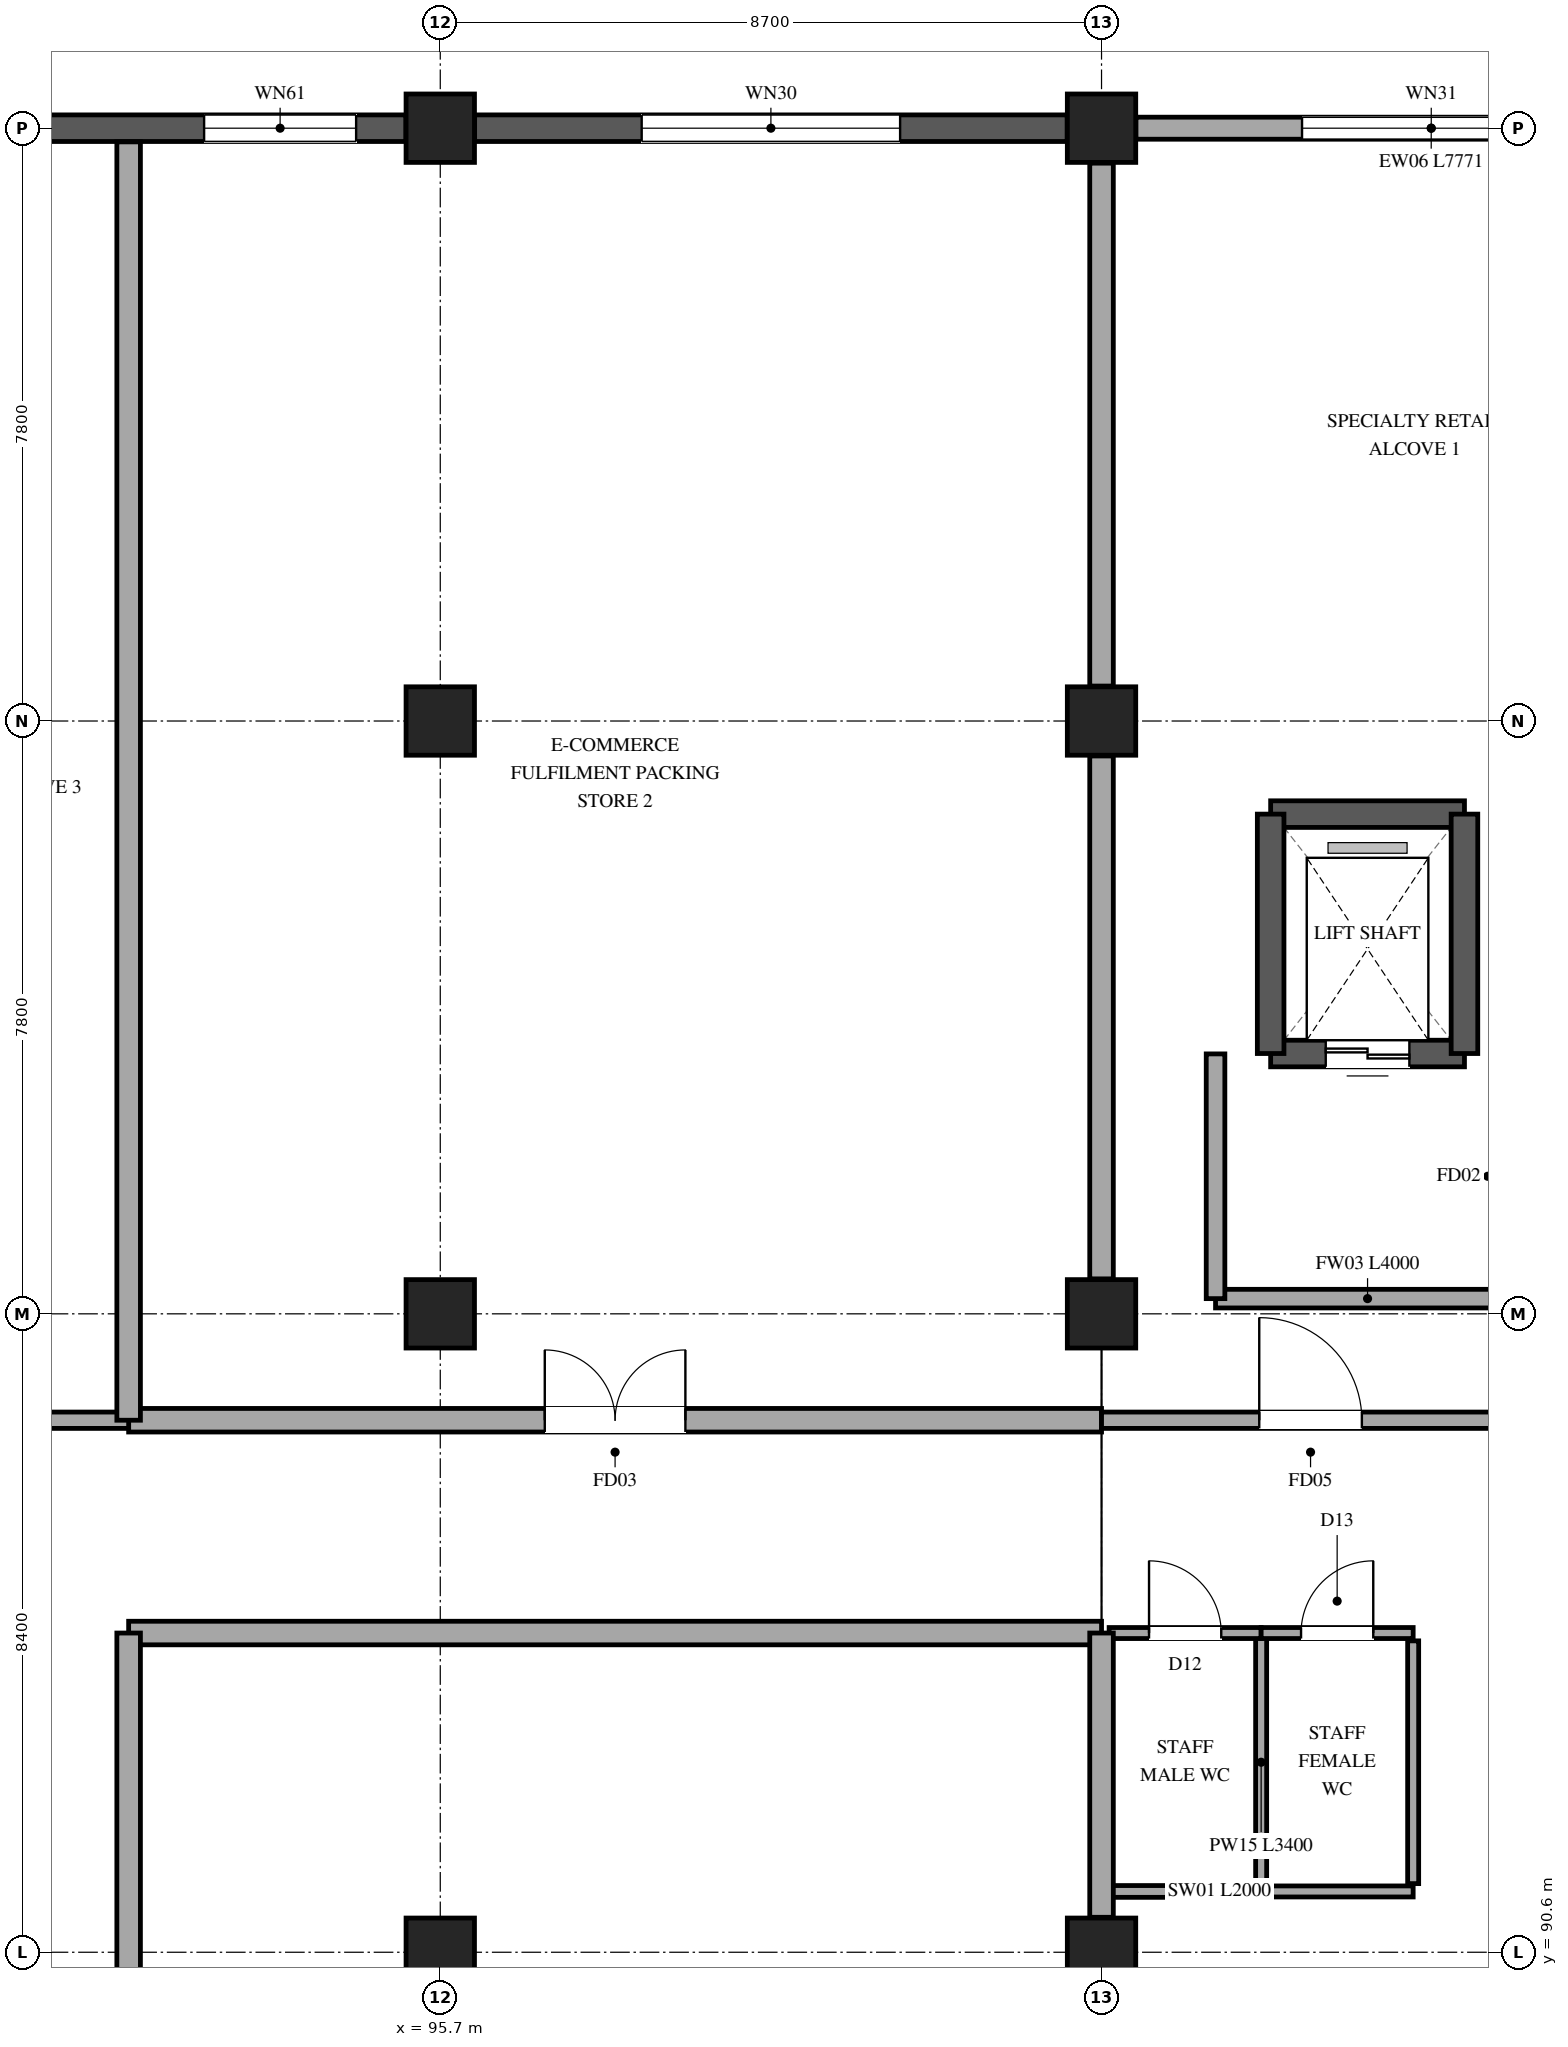
"""IFC4 building model, lengths in metres.
Left out: names, types, materials, properties, quantities, classifications, styles, units other than length and angle.
Written with IfcOpenShell. Run it as: python <this file> out.ifc"""

import sys

from ifc_helpers import new_model, si_unit, direction, frame, frame_2d, origin, origin_2d, place, context, subcontext, project, spatial, rectangle, extrude, element, fill, save


model = new_model("IFC4")
c1 = context("Model", 3, precision=1e-05, world=origin(), true_north=direction((0.0, 1.0)))
c2 = subcontext(c1, "Body", "Model", "MODEL_VIEW")
j1 = project(units=[si_unit("LENGTHUNIT", "METRE"), si_unit("PLANEANGLEUNIT", "RADIAN")], contexts=[c1])
p1 = place(None, origin())
s1 = spatial("IfcSite", under=j1, at=p1, CompositionType="ELEMENT")
p2 = place(p1, origin())
s2 = spatial("IfcBuilding", under=s1, at=p2, CompositionType="ELEMENT")
p3 = place(p2, frame((0.0, 0.0, 11.4)))
s3 = spatial("IfcBuildingStorey", under=s2, at=p3, CompositionType="ELEMENT", Elevation=11.4)
for number, where, z_axis, x_axis in (
    (1, (95.7, 90.6, 0.0), (0.0, 0.0, 1.0), (1.0, 0.0, 0.0)),
    (2, (95.7, 99.0, 0.0), (0.0, 0.0, 1.0), (1.0, 0.0, 0.0)),
    (3, (95.7, 106.8, 0.0), (0.0, 0.0, 1.0), (1.0, 0.0, 0.0)),
    (4, (95.7, 114.6, 0.0), (0.0, 0.0, 1.0), (1.0, 0.0, 0.0)),
    (5, (104.4, 90.6, 0.0), (0.0, 0.0, 1.0), (1.0, 0.0, 0.0)),
    (6, (104.4, 99.0, 0.0), (0.0, 0.0, 1.0), (1.0, 0.0, 0.0)),
    (7, (104.4, 106.8, 0.0), (0.0, 0.0, 1.0), (1.0, 0.0, 0.0)),
    (8, (104.4, 114.6, 0.0), (0.0, 0.0, 1.0), (1.0, 0.0, 0.0)),
):
    element("IfcColumn", number, at=place(p3, frame(where, z_axis=z_axis, x_axis=x_axis)), inside=s3, PredefinedType="COLUMN", context=c2, shape_type="SweptSolid", body=[
        extrude(rectangle(XDim=0.9, YDim=0.9, at=origin_2d()), origin(), (0.0, 0.0, 1.0), 5.1),
    ])
p4 = place(p3, frame((87.452, 114.6, 0.0), z_axis=(0.0, 0.0, 1.0), x_axis=(1.0, 0.0, 0.0)))
e9 = element("IfcWall", 9, at=p4, inside=s3, PredefinedType="STANDARD", context=c2, shape_type="SweptSolid", body=[
    extrude(rectangle(XDim=7.796, YDim=0.35, at=frame_2d((3.898, 0.0))), origin(), (0.0, 0.0, 1.0), 4.79),
])
p5 = place(p4, frame((5.141, 0.0, 0.85)))
e10 = element("IfcOpeningElement", 10, at=p5, cuts=e9, PredefinedType="OPENING", context=c2, shape_type="SweptSolid", body=[
    extrude(rectangle(XDim=2.0, YDim=1.65, at=frame_2d((1.0, 0.825))), frame((0.0, 0.185, 0.0), z_axis=(0.0, -1.0, 0.0), x_axis=(1.0, 0.0, 0.0)), (0.0, 0.0, 1.0), 0.37),
])
p6 = place(p3, frame((96.152, 114.6, 0.0), z_axis=(0.0, 0.0, 1.0), x_axis=(1.0, 0.0, 0.0)))
e11 = element("IfcWall", 11, at=p6, inside=s3, PredefinedType="STANDARD", context=c2, shape_type="SweptSolid", body=[
    extrude(rectangle(XDim=7.796, YDim=0.35, at=frame_2d((3.898, 0.0))), origin(), (0.0, 0.0, 1.0), 4.79),
])
p7 = place(p6, frame((2.198, 0.0, 0.85)))
e12 = element("IfcOpeningElement", 12, at=p7, cuts=e11, PredefinedType="OPENING", context=c2, shape_type="SweptSolid", body=[
    extrude(rectangle(XDim=3.4, YDim=2.4, at=frame_2d((1.7, 1.2))), frame((0.0, 0.185, 0.0), z_axis=(0.0, -1.0, 0.0), x_axis=(1.0, 0.0, 0.0)), (0.0, 0.0, 1.0), 0.37),
])
p8 = place(p3, frame((104.852, 114.6, 0.0), z_axis=(0.0, 0.0, 1.0), x_axis=(1.0, 0.0, 0.0)))
e13 = element("IfcWall", 13, at=p8, inside=s3, PredefinedType="STANDARD", context=c2, shape_type="SweptSolid", body=[
    extrude(rectangle(XDim=7.771, YDim=0.29, at=frame_2d((3.885, 0.0))), origin(), (0.0, 0.0, 1.0), 4.055),
])
p9 = place(p8, frame((2.186, 0.0, 0.85)))
e14 = element("IfcOpeningElement", 14, at=p9, cuts=e13, PredefinedType="OPENING", context=c2, shape_type="SweptSolid", body=[
    extrude(rectangle(XDim=3.4, YDim=2.2, at=frame_2d((1.7, 1.1))), frame((0.0, 0.155, 0.0), z_axis=(0.0, -1.0, 0.0), x_axis=(1.0, 0.0, 0.0)), (0.0, 0.0, 1.0), 0.31),
])
p10 = place(p3, frame((106.625, 105.575, 0.0), z_axis=(0.0, 0.0, 1.0), x_axis=(1.0, 0.0, 0.0)))
e15 = element("IfcWall", 15, at=p10, inside=s3, PredefinedType="SHEAR", context=c2, shape_type="SweptSolid", body=[
    extrude(rectangle(XDim=2.55, YDim=0.35, at=frame_2d((1.275, 0.0))), origin(), (0.0, 0.0, 1.0), 5.1),
])
p11 = place(p3, frame((109.175, 102.425, 0.0), z_axis=(0.0, 0.0, 1.0), x_axis=(-1.0, 0.0, 0.0)))
e16 = element("IfcWall", 16, at=p11, inside=s3, PredefinedType="SHEAR", context=c2, shape_type="SweptSolid", body=[
    extrude(rectangle(XDim=2.55, YDim=0.35, at=frame_2d((1.275, 0.0))), origin(), (0.0, 0.0, 1.0), 5.1),
])
p12 = place(p11, frame((0.725, 0.0, 0.0)))
e17 = element("IfcOpeningElement", 17, at=p12, cuts=e16, PredefinedType="OPENING", context=c2, shape_type="SweptSolid", body=[
    extrude(rectangle(XDim=1.1, YDim=2.2, at=frame_2d((0.55, 1.1))), frame((0.0, 0.185, 0.0), z_axis=(0.0, -1.0, 0.0), x_axis=(1.0, 0.0, 0.0)), (0.0, 0.0, 1.0), 0.37),
])
for number, where, z_axis, x_axis in (
    (18, (106.625, 102.425, 0.0), (0.0, 0.0, 1.0), (0.0, 1.0, 0.0)),
    (19, (109.175, 105.575, 0.0), (0.0, 0.0, 1.0), (0.0, -1.0, 0.0)),
):
    element("IfcWall", number, at=place(p3, frame(where, z_axis=z_axis, x_axis=x_axis)), inside=s3, PredefinedType="SHEAR", context=c2, shape_type="SweptSolid", body=[
        extrude(rectangle(XDim=3.15, YDim=0.35, at=frame_2d((1.575, 0.0))), origin(), (0.0, 0.0, 1.0), 5.1),
    ])
p13 = place(p3, frame((109.9, 99.2, 0.0), z_axis=(0.0, 0.0, 1.0), x_axis=(-1.0, 0.0, 0.0)))
e20 = element("IfcWall", 20, at=p13, inside=s3, PredefinedType="STANDARD", context=c2, shape_type="SweptSolid", body=[
    extrude(rectangle(XDim=4.0, YDim=0.245, at=frame_2d((2.0, 0.0))), origin(), (0.0, 0.0, 1.0), 4.075),
])
p14 = place(p3, frame((105.9, 99.2, 0.0), z_axis=(0.0, 0.0, 1.0), x_axis=(0.0, 1.0, 0.0)))
e21 = element("IfcWall", 21, at=p14, inside=s3, PredefinedType="STANDARD", context=c2, shape_type="SweptSolid", body=[
    extrude(rectangle(XDim=3.22, YDim=0.245, at=frame_2d((1.61, 0.0))), origin(), (0.0, 0.0, 1.0), 4.075),
])
p15 = place(p3, frame((106.5, 94.8, 0.0), z_axis=(0.0, 0.0, 1.0), x_axis=(0.0, -1.0, 0.0)))
e22 = element("IfcWall", 22, at=p15, inside=s3, PredefinedType="PARTITIONING", context=c2, shape_type="SweptSolid", body=[
    extrude(rectangle(XDim=3.4, YDim=0.145, at=frame_2d((1.7, 0.0))), origin(), (0.0, 0.0, 1.0), 4.76),
])
p16 = place(p3, frame((104.5, 94.8, 0.0), z_axis=(0.0, 0.0, 1.0), x_axis=(1.0, 0.0, 0.0)))
e23 = element("IfcWall", 23, at=p16, inside=s3, PredefinedType="PARTITIONING", context=c2, shape_type="SweptSolid", body=[
    extrude(rectangle(XDim=2.0, YDim=0.145, at=frame_2d((1.0, 0.0))), origin(), (0.0, 0.0, 1.0), 4.175),
])
p17 = place(p16, frame((0.525, 0.0, 0.0)))
e24 = element("IfcOpeningElement", 24, at=p17, cuts=e23, PredefinedType="OPENING", context=c2, shape_type="SweptSolid", body=[
    extrude(rectangle(XDim=0.95, YDim=2.15, at=frame_2d((0.475, 1.075))), frame((0.0, 0.083, 0.0), z_axis=(0.0, -1.0, 0.0), x_axis=(1.0, 0.0, 0.0)), (0.0, 0.0, 1.0), 0.165),
])
p18 = place(p3, frame((106.5, 91.4, 0.0), z_axis=(0.0, 0.0, 1.0), x_axis=(-1.0, 0.0, 0.0)))
e25 = element("IfcWall", 25, at=p18, inside=s3, PredefinedType="MOVABLE", context=c2, shape_type="SweptSolid", body=[
    extrude(rectangle(XDim=2.0, YDim=0.155, at=frame_2d((1.0, 0.0))), origin(), (0.0, 0.0, 1.0), 4.175),
])
p19 = place(p3, frame((106.5, 94.8, 0.0), z_axis=(0.0, 0.0, 1.0), x_axis=(1.0, 0.0, 0.0)))
e26 = element("IfcWall", 26, at=p19, inside=s3, PredefinedType="PARTITIONING", context=c2, shape_type="SweptSolid", body=[
    extrude(rectangle(XDim=2.0, YDim=0.145, at=frame_2d((1.0, 0.0))), origin(), (0.0, 0.0, 1.0), 4.76),
])
p20 = place(p19, frame((0.525, 0.0, 0.0)))
e27 = element("IfcOpeningElement", 27, at=p20, cuts=e26, PredefinedType="OPENING", context=c2, shape_type="SweptSolid", body=[
    extrude(rectangle(XDim=0.95, YDim=2.2, at=frame_2d((0.475, 1.1))), frame((0.0, 0.083, 0.0), z_axis=(0.0, -1.0, 0.0), x_axis=(1.0, 0.0, 0.0)), (0.0, 0.0, 1.0), 0.165),
])
p21 = place(p3, frame((108.5, 91.4, 0.0), z_axis=(0.0, 0.0, 1.0), x_axis=(-1.0, 0.0, 0.0)))
e28 = element("IfcWall", 28, at=p21, inside=s3, PredefinedType="PARTITIONING", context=c2, shape_type="SweptSolid", body=[
    extrude(rectangle(XDim=2.0, YDim=0.145, at=frame_2d((1.0, 0.0))), origin(), (0.0, 0.0, 1.0), 4.76),
])
p22 = place(p3, frame((104.4, 94.8, 0.0), z_axis=(0.0, 0.0, 1.0), x_axis=(-1.0, 0.0, 0.0)))
e29 = element("IfcWall", 29, at=p22, inside=s3, PredefinedType="STANDARD", context=c2, shape_type="SweptSolid", body=[
    extrude(rectangle(XDim=12.8, YDim=0.31, at=frame_2d((6.4, 0.0))), origin(), (0.0, 0.0, 1.0), 4.06),
])
p23 = place(p3, frame((91.6, 94.8, 0.0), z_axis=(0.0, 0.0, 1.0), x_axis=(0.0, -1.0, 0.0)))
e30 = element("IfcWall", 30, at=p23, inside=s3, PredefinedType="STANDARD", context=c2, shape_type="SweptSolid", body=[
    extrude(rectangle(XDim=21.0, YDim=0.31, at=frame_2d((10.5, 0.0))), origin(), (0.0, 0.0, 1.0), 4.06),
])
p24 = place(p23, frame((9.575, 0.0, 0.0)))
e31 = element("IfcOpeningElement", 31, at=p24, cuts=e30, PredefinedType="OPENING", context=c2, shape_type="SweptSolid", body=[
    extrude(rectangle(XDim=1.85, YDim=2.3, at=frame_2d((0.925, 1.15))), frame((0.0, 0.165, 0.0), z_axis=(0.0, -1.0, 0.0), x_axis=(1.0, 0.0, 0.0)), (0.0, 0.0, 1.0), 0.33),
])
p25 = place(p3, frame((91.6, 97.6, 0.0), z_axis=(0.0, 0.0, 1.0), x_axis=(1.0, 0.0, 0.0)))
e32 = element("IfcWall", 32, at=p25, inside=s3, PredefinedType="STANDARD", context=c2, shape_type="SweptSolid", body=[
    extrude(rectangle(XDim=12.8, YDim=0.31, at=frame_2d((6.4, 0.0))), origin(), (0.0, 0.0, 1.0), 4.06),
])
p26 = place(p25, frame((5.475, 0.0, 0.0)))
e33 = element("IfcOpeningElement", 33, at=p26, cuts=e32, PredefinedType="OPENING", context=c2, shape_type="SweptSolid", body=[
    extrude(rectangle(XDim=1.85, YDim=2.3, at=frame_2d((0.925, 1.15))), frame((0.0, 0.165, 0.0), z_axis=(0.0, -1.0, 0.0), x_axis=(1.0, 0.0, 0.0)), (0.0, 0.0, 1.0), 0.33),
])
p27 = place(p3, frame((104.4, 97.6, 0.0), z_axis=(0.0, 0.0, 1.0), x_axis=(1.0, 0.0, 0.0)))
e34 = element("IfcWall", 34, at=p27, inside=s3, PredefinedType="PARTITIONING", context=c2, shape_type="SweptSolid", body=[
    extrude(rectangle(XDim=5.5, YDim=0.215, at=frame_2d((2.75, 0.0))), origin(), (0.0, 0.0, 1.0), 4.175),
])
p28 = place(p27, frame((2.075, 0.0, 0.0)))
e35 = element("IfcOpeningElement", 35, at=p28, cuts=e34, PredefinedType="OPENING", context=c2, shape_type="SweptSolid", body=[
    extrude(rectangle(XDim=1.35, YDim=2.2, at=frame_2d((0.675, 1.1))), frame((0.0, 0.118, 0.0), z_axis=(0.0, -1.0, 0.0), x_axis=(1.0, 0.0, 0.0)), (0.0, 0.0, 1.0), 0.235),
])
p29 = place(p3, frame((88.2, 97.6, 0.0), z_axis=(0.0, 0.0, 1.0), x_axis=(1.0, 0.0, 0.0)))
e36 = element("IfcWall", 36, at=p29, inside=s3, PredefinedType="PARTITIONING", context=c2, shape_type="SweptSolid", body=[
    extrude(rectangle(XDim=3.4, YDim=0.215, at=frame_2d((1.7, 0.0))), origin(), (0.0, 0.0, 1.0), 4.76),
])
p30 = place(p29, frame((1.025, 0.0, 0.0)))
e37 = element("IfcOpeningElement", 37, at=p30, cuts=e36, PredefinedType="OPENING", context=c2, shape_type="SweptSolid", body=[
    extrude(rectangle(XDim=1.35, YDim=2.2, at=frame_2d((0.675, 1.1))), frame((0.0, 0.118, 0.0), z_axis=(0.0, -1.0, 0.0), x_axis=(1.0, 0.0, 0.0)), (0.0, 0.0, 1.0), 0.235),
])
p31 = place(p3, frame((104.4, 94.8, 0.0), z_axis=(0.0, 0.0, 1.0), x_axis=(0.0, -1.0, 0.0)))
e38 = element("IfcWall", 38, at=p31, inside=s3, PredefinedType="STANDARD", context=c2, shape_type="SweptSolid", body=[
    extrude(rectangle(XDim=3.74, YDim=0.31, at=frame_2d((1.87, 0.0))), origin(), (0.0, 0.0, 1.0), 4.175),
])
p32 = place(p3, frame((104.4, 114.14, 0.0), z_axis=(0.0, 0.0, 1.0), x_axis=(0.0, -1.0, 0.0)))
e39 = element("IfcWall", 39, at=p32, inside=s3, PredefinedType="STANDARD", context=c2, shape_type="SweptSolid", body=[
    extrude(rectangle(XDim=6.88, YDim=0.31, at=frame_2d((3.44, 0.0))), origin(), (0.0, 0.0, 1.0), 4.075),
])
p33 = place(p3, frame((104.4, 106.34, 0.0), z_axis=(0.0, 0.0, 1.0), x_axis=(0.0, -1.0, 0.0)))
e40 = element("IfcWall", 40, at=p33, inside=s3, PredefinedType="STANDARD", context=c2, shape_type="SweptSolid", body=[
    extrude(rectangle(XDim=6.88, YDim=0.31, at=frame_2d((3.44, 0.0))), origin(), (0.0, 0.0, 1.0), 4.175),
])
p34 = place(p3, frame((91.6, 97.6, 0.0), z_axis=(0.0, 0.0, 1.0), x_axis=(0.0, 1.0, 0.0)))
e41 = element("IfcWall", 41, at=p34, inside=s3, PredefinedType="STANDARD", context=c2, shape_type="SweptSolid", body=[
    extrude(rectangle(XDim=16.82, YDim=0.31, at=frame_2d((8.41, 0.0))), origin(), (0.0, 0.0, 1.0), 4.06),
])
p35 = place(p3, frame((108.5, 94.697, 0.0), z_axis=(0.0, 0.0, 1.0), x_axis=(0.0, -1.0, 0.0)))
e42 = element("IfcWall", 42, at=p35, inside=s3, PredefinedType="PARTITIONING", context=c2, shape_type="SweptSolid", body=[
    extrude(rectangle(XDim=3.194, YDim=0.145, at=frame_2d((1.597, 0.0))), origin(), (0.0, 0.0, 1.0), 4.76),
])
p36 = place(p5, origin())
e43 = element("IfcWindow", 43, at=p36, inside=s3, PartitioningType="TRIPLE_PANEL_VERTICAL", PredefinedType="WINDOW", context=c2, shape_type="SweptSolid", body=[
    extrude(rectangle(XDim=2.0, YDim=1.65, at=frame_2d((1.0, 0.825))), frame((0.0, 0.03, 0.0), z_axis=(0.0, -1.0, 0.0), x_axis=(1.0, 0.0, 0.0)), (0.0, 0.0, 1.0), 0.06),
])
fill(e10, e43)
p37 = place(p7, origin())
e44 = element("IfcWindow", 44, at=p37, inside=s3, PartitioningType="TRIPLE_PANEL_VERTICAL", PredefinedType="WINDOW", context=c2, shape_type="SweptSolid", body=[
    extrude(rectangle(XDim=3.4, YDim=2.4, at=frame_2d((1.7, 1.2))), frame((0.0, 0.03, 0.0), z_axis=(0.0, -1.0, 0.0), x_axis=(1.0, 0.0, 0.0)), (0.0, 0.0, 1.0), 0.06),
])
fill(e12, e44)
p38 = place(p9, origin())
e45 = element("IfcWindow", 45, at=p38, inside=s3, PartitioningType="TRIPLE_PANEL_VERTICAL", PredefinedType="WINDOW", context=c2, shape_type="SweptSolid", body=[
    extrude(rectangle(XDim=3.4, YDim=2.2, at=frame_2d((1.7, 1.1))), frame((0.0, 0.03, 0.0), z_axis=(0.0, -1.0, 0.0), x_axis=(1.0, 0.0, 0.0)), (0.0, 0.0, 1.0), 0.06),
])
fill(e14, e45)
p39 = place(p12, origin())
e46 = element("IfcDoor", 46, at=p39, inside=s3, OperationType="DOUBLE_DOOR_SLIDING", PredefinedType="DOOR", context=c2, shape_type="SweptSolid", body=[
    extrude(rectangle(XDim=1.1, YDim=2.2, at=frame_2d((0.55, 1.1))), frame((0.0, 0.025, 0.0), z_axis=(0.0, -1.0, 0.0), x_axis=(1.0, 0.0, 0.0)), (0.0, 0.0, 1.0), 0.05),
])
fill(e17, e46)
p40 = place(p17, origin())
e47 = element("IfcDoor", 47, at=p40, inside=s3, OperationType="SINGLE_SWING_LEFT", PredefinedType="DOOR", context=c2, shape_type="SweptSolid", body=[
    extrude(rectangle(XDim=0.95, YDim=2.15, at=frame_2d((0.475, 1.075))), frame((0.0, 0.025, 0.0), z_axis=(0.0, -1.0, 0.0), x_axis=(1.0, 0.0, 0.0)), (0.0, 0.0, 1.0), 0.05),
])
fill(e24, e47)
p41 = place(p20, origin())
e48 = element("IfcDoor", 48, at=p41, inside=s3, OperationType="SINGLE_SWING_RIGHT", PredefinedType="DOOR", context=c2, shape_type="SweptSolid", body=[
    extrude(rectangle(XDim=0.95, YDim=2.2, at=frame_2d((0.475, 1.1))), frame((0.0, 0.025, 0.0), z_axis=(0.0, -1.0, 0.0), x_axis=(1.0, 0.0, 0.0)), (0.0, 0.0, 1.0), 0.05),
])
fill(e27, e48)
p42 = place(p26, origin())
e49 = element("IfcDoor", 49, at=p42, inside=s3, OperationType="DOUBLE_DOOR_SINGLE_SWING", PredefinedType="DOOR", context=c2, shape_type="SweptSolid", body=[
    extrude(rectangle(XDim=1.85, YDim=2.3, at=frame_2d((0.925, 1.15))), frame((0.0, 0.025, 0.0), z_axis=(0.0, -1.0, 0.0), x_axis=(1.0, 0.0, 0.0)), (0.0, 0.0, 1.0), 0.05),
])
fill(e33, e49)
p43 = place(p28, origin())
e50 = element("IfcDoor", 50, at=p43, inside=s3, OperationType="SINGLE_SWING_LEFT", PredefinedType="DOOR", context=c2, shape_type="SweptSolid", body=[
    extrude(rectangle(XDim=1.35, YDim=2.2, at=frame_2d((0.675, 1.1))), frame((0.0, 0.025, 0.0), z_axis=(0.0, -1.0, 0.0), x_axis=(1.0, 0.0, 0.0)), (0.0, 0.0, 1.0), 0.05),
])
fill(e35, e50)
save(model, sys.argv[1])
